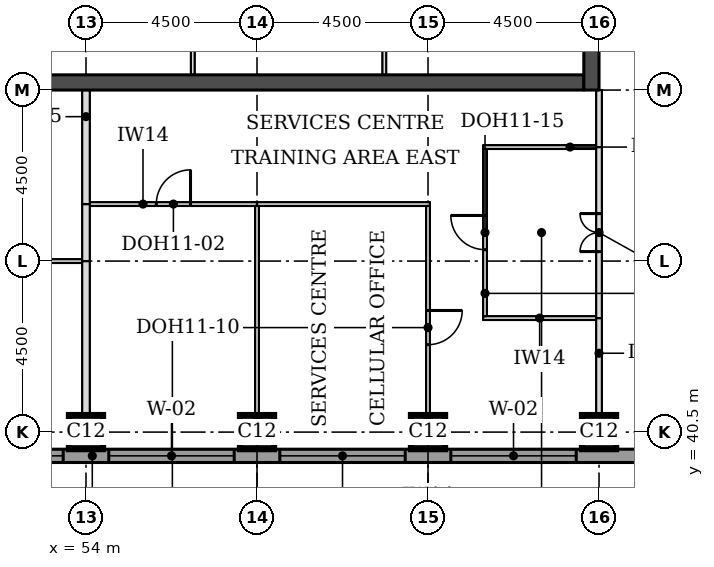
"""IFC4 building model, lengths in metres.
Left out: names, types, materials, properties, quantities, classifications, styles, units other than length and angle.
Written with IfcOpenShell. Run it as: python <this file> out.ifc"""

import sys

from ifc_helpers import new_model, si_unit, direction, frame, frame_2d, origin, origin_2d, place, context, subcontext, project, spatial, rectangle, extrude, element, fill, save


model = new_model("IFC4")
c1 = context("Model", 3, precision=1e-05, world=origin(), true_north=direction((0.0, 1.0)))
c2 = subcontext(c1, "Body", "Model", "MODEL_VIEW")
j1 = project(units=[si_unit("LENGTHUNIT", "METRE"), si_unit("PLANEANGLEUNIT", "RADIAN")], contexts=[c1])
p1 = place(None, origin())
s1 = spatial("IfcSite", under=j1, at=p1, CompositionType="ELEMENT")
p2 = place(p1, origin())
s2 = spatial("IfcBuilding", under=s1, at=p2, CompositionType="ELEMENT")
p3 = place(p2, frame((0.0, 0.0, 237.8)))
s3 = spatial("IfcBuildingStorey", under=s2, at=p3, CompositionType="ELEMENT", Elevation=237.8)
for number, where, z_axis, x_axis in (
    (1, (54.0, 40.5, 0.0), (0.0, 0.0, 1.0), (1.0, 0.0, 0.0)),
    (2, (58.5, 40.5, 0.0), (0.0, 0.0, 1.0), (1.0, 0.0, 0.0)),
    (3, (63.0, 40.5, 0.0), (0.0, 0.0, 1.0), (1.0, 0.0, 0.0)),
    (4, (67.5, 40.5, 0.0), (0.0, 0.0, 1.0), (1.0, 0.0, 0.0)),
):
    element("IfcColumn", number, at=place(p3, frame(where, z_axis=z_axis, x_axis=x_axis)), inside=s3, PredefinedType="COLUMN", context=c2, shape_type="SweptSolid", body=[
        extrude(rectangle(XDim=0.9, YDim=0.9, at=origin_2d()), origin(), (0.0, 0.0, 1.0), 3.7),
    ])
p4 = place(p3, frame((45.4, 49.7, 0.0), z_axis=(0.0, 0.0, 1.0), x_axis=(1.0, 0.0, 0.0)))
e5 = element("IfcWall", 5, at=p4, inside=s3, PredefinedType="SHEAR", context=c2, shape_type="SweptSolid", body=[
    extrude(rectangle(XDim=21.7, YDim=0.4, at=frame_2d((10.85, 0.0))), origin(), (0.0, 0.0, 1.0), 3.7),
])
p5 = place(p3, frame((67.3, 49.5, 0.0), z_axis=(0.0, 0.0, 1.0), x_axis=(0.0, 1.0, 0.0)))
e6 = element("IfcWall", 6, at=p5, inside=s3, PredefinedType="SHEAR", context=c2, shape_type="SweptSolid", body=[
    extrude(rectangle(XDim=22.5, YDim=0.4, at=frame_2d((11.25, 0.0))), origin(), (0.0, 0.0, 1.0), 3.7),
])
p6 = place(p5, frame((4.2, 0.0, 0.0)))
e7 = element("IfcOpeningElement", 7, at=p6, cuts=e6, PredefinedType="OPENING", context=c2, shape_type="SweptSolid", body=[
    extrude(rectangle(XDim=1.8, YDim=2.1, at=frame_2d((0.9, 1.05))), frame((0.0, 0.21, 0.0), z_axis=(0.0, -1.0, 0.0), x_axis=(1.0, 0.0, 0.0)), (0.0, 0.0, 1.0), 0.42),
])
p7 = place(p5, frame((6.9, 0.0, 0.0)))
e8 = element("IfcOpeningElement", 8, at=p7, cuts=e6, PredefinedType="OPENING", context=c2, shape_type="SweptSolid", body=[
    extrude(rectangle(XDim=1.1, YDim=2.1, at=frame_2d((0.55, 1.05))), frame((0.0, 0.21, 0.0), z_axis=(0.0, -1.0, 0.0), x_axis=(1.0, 0.0, 0.0)), (0.0, 0.0, 1.0), 0.42),
])
p8 = place(p5, frame((13.6, 0.0, 0.0)))
e9 = element("IfcOpeningElement", 9, at=p8, cuts=e6, PredefinedType="OPENING", context=c2, shape_type="SweptSolid", body=[
    extrude(rectangle(XDim=1.1, YDim=2.1, at=frame_2d((0.55, 1.05))), frame((0.0, 0.21, 0.0), z_axis=(0.0, -1.0, 0.0), x_axis=(1.0, 0.0, 0.0)), (0.0, 0.0, 1.0), 0.42),
])
p9 = place(p5, frame((16.5, 0.0, 0.0)))
e10 = element("IfcOpeningElement", 10, at=p9, cuts=e6, PredefinedType="OPENING", context=c2, shape_type="SweptSolid", body=[
    extrude(rectangle(XDim=1.8, YDim=2.1, at=frame_2d((0.9, 1.05))), frame((0.0, 0.21, 0.0), z_axis=(0.0, -1.0, 0.0), x_axis=(1.0, 0.0, 0.0)), (0.0, 0.0, 1.0), 0.42),
])
p10 = place(p3, frame((36.0, 39.875, 0.0), z_axis=(0.0, 0.0, 1.0), x_axis=(1.0, 0.0, 0.0)))
e11 = element("IfcWall", 11, at=p10, inside=s3, PredefinedType="STANDARD", context=c2, shape_type="SweptSolid", body=[
    extrude(rectangle(XDim=36.331, YDim=0.35, at=frame_2d((18.166, 0.0))), origin(), (0.0, 0.0, 1.0), 3.525),
])
p11 = place(p10, frame((5.1, 0.0, 0.9)))
e12 = element("IfcOpeningElement", 12, at=p11, cuts=e11, PredefinedType="OPENING", context=c2, shape_type="SweptSolid", body=[
    extrude(rectangle(XDim=3.3, YDim=1.9, at=frame_2d((1.65, 0.95))), frame((0.0, 0.185, 0.0), z_axis=(0.0, -1.0, 0.0), x_axis=(1.0, 0.0, 0.0)), (0.0, 0.0, 1.0), 0.37),
])
p12 = place(p10, frame((9.6, 0.0, 0.9)))
e13 = element("IfcOpeningElement", 13, at=p12, cuts=e11, PredefinedType="OPENING", context=c2, shape_type="SweptSolid", body=[
    extrude(rectangle(XDim=3.3, YDim=1.9, at=frame_2d((1.65, 0.95))), frame((0.0, 0.185, 0.0), z_axis=(0.0, -1.0, 0.0), x_axis=(1.0, 0.0, 0.0)), (0.0, 0.0, 1.0), 0.37),
])
p13 = place(p10, frame((14.1, 0.0, 0.9)))
e14 = element("IfcOpeningElement", 14, at=p13, cuts=e11, PredefinedType="OPENING", context=c2, shape_type="SweptSolid", body=[
    extrude(rectangle(XDim=3.3, YDim=1.9, at=frame_2d((1.65, 0.95))), frame((0.0, 0.185, 0.0), z_axis=(0.0, -1.0, 0.0), x_axis=(1.0, 0.0, 0.0)), (0.0, 0.0, 1.0), 0.37),
])
p14 = place(p10, frame((18.6, 0.0, 0.9)))
e15 = element("IfcOpeningElement", 15, at=p14, cuts=e11, PredefinedType="OPENING", context=c2, shape_type="SweptSolid", body=[
    extrude(rectangle(XDim=3.3, YDim=1.9, at=frame_2d((1.65, 0.95))), frame((0.0, 0.185, 0.0), z_axis=(0.0, -1.0, 0.0), x_axis=(1.0, 0.0, 0.0)), (0.0, 0.0, 1.0), 0.37),
])
p15 = place(p10, frame((23.1, 0.0, 0.9)))
e16 = element("IfcOpeningElement", 16, at=p15, cuts=e11, PredefinedType="OPENING", context=c2, shape_type="SweptSolid", body=[
    extrude(rectangle(XDim=3.3, YDim=1.9, at=frame_2d((1.65, 0.95))), frame((0.0, 0.185, 0.0), z_axis=(0.0, -1.0, 0.0), x_axis=(1.0, 0.0, 0.0)), (0.0, 0.0, 1.0), 0.37),
])
p16 = place(p10, frame((27.6, 0.0, 0.9)))
e17 = element("IfcOpeningElement", 17, at=p16, cuts=e11, PredefinedType="OPENING", context=c2, shape_type="SweptSolid", body=[
    extrude(rectangle(XDim=3.3, YDim=1.9, at=frame_2d((1.65, 0.95))), frame((0.0, 0.185, 0.0), z_axis=(0.0, -1.0, 0.0), x_axis=(1.0, 0.0, 0.0)), (0.0, 0.0, 1.0), 0.37),
])
p17 = place(p3, frame((64.45, 43.5, 0.0), z_axis=(0.0, 0.0, 1.0), x_axis=(1.0, 0.0, 0.0)))
e18 = element("IfcWall", 18, at=p17, inside=s3, PredefinedType="PARTITIONING", context=c2, shape_type="SweptSolid", body=[
    extrude(rectangle(XDim=2.975, YDim=0.1, at=frame_2d((1.488, 0.0))), origin(), (0.0, 0.0, 1.0), 3.55),
])
p18 = place(p3, frame((49.45, 45.0, 0.0), z_axis=(0.0, 0.0, 1.0), x_axis=(1.0, 0.0, 0.0)))
e19 = element("IfcWall", 19, at=p18, inside=s3, PredefinedType="PARTITIONING", context=c2, shape_type="SweptSolid", body=[
    extrude(rectangle(XDim=4.45, YDim=0.1, at=frame_2d((2.225, 0.0))), origin(), (0.0, 0.0, 1.0), 3.55),
])
p19 = place(p3, frame((54.1, 46.5, 0.0), z_axis=(0.0, 0.0, 1.0), x_axis=(1.0, 0.0, 0.0)))
e20 = element("IfcWall", 20, at=p19, inside=s3, PredefinedType="PARTITIONING", context=c2, shape_type="SweptSolid", body=[
    extrude(rectangle(XDim=4.4, YDim=0.1, at=frame_2d((2.2, 0.0))), origin(), (0.0, 0.0, 1.0), 3.55),
])
p20 = place(p19, frame((1.75, 0.0, 0.0)))
e21 = element("IfcOpeningElement", 21, at=p20, cuts=e20, PredefinedType="OPENING", context=c2, shape_type="SweptSolid", body=[
    extrude(rectangle(XDim=0.9, YDim=2.1, at=frame_2d((0.45, 1.05))), frame((0.0, 0.06, 0.0), z_axis=(0.0, -1.0, 0.0), x_axis=(1.0, 0.0, 0.0)), (0.0, 0.0, 1.0), 0.12),
])
p21 = place(p3, frame((58.5, 46.5, 0.0), z_axis=(0.0, 0.0, 1.0), x_axis=(1.0, 0.0, 0.0)))
e22 = element("IfcWall", 22, at=p21, inside=s3, PredefinedType="PARTITIONING", context=c2, shape_type="SweptSolid", body=[
    extrude(rectangle(XDim=4.55, YDim=0.1, at=frame_2d((2.275, 0.0))), origin(), (0.0, 0.0, 1.0), 3.55),
])
p22 = place(p3, frame((64.45, 48.0, 0.0), z_axis=(0.0, 0.0, 1.0), x_axis=(1.0, 0.0, 0.0)))
e23 = element("IfcWall", 23, at=p22, inside=s3, PredefinedType="PARTITIONING", context=c2, shape_type="SweptSolid", body=[
    extrude(rectangle(XDim=2.975, YDim=0.1, at=frame_2d((1.488, 0.0))), origin(), (0.0, 0.0, 1.0), 3.55),
])
p23 = place(p3, frame((54.0, 40.05, 0.0), z_axis=(0.0, 0.0, 1.0), x_axis=(0.0, 1.0, 0.0)))
e24 = element("IfcWall", 24, at=p23, inside=s3, PredefinedType="PARTITIONING", context=c2, shape_type="SweptSolid", body=[
    extrude(rectangle(XDim=4.95, YDim=0.2, at=frame_2d((2.475, 0.0))), origin(), (0.0, 0.0, 1.0), 3.55),
])
p24 = place(p3, frame((58.5, 40.05, 0.0), z_axis=(0.0, 0.0, 1.0), x_axis=(0.0, 1.0, 0.0)))
e25 = element("IfcWall", 25, at=p24, inside=s3, PredefinedType="PARTITIONING", context=c2, shape_type="SweptSolid", body=[
    extrude(rectangle(XDim=6.4, YDim=0.1, at=frame_2d((3.2, 0.0))), origin(), (0.0, 0.0, 1.0), 3.55),
])
p25 = place(p3, frame((63.0, 40.05, 0.0), z_axis=(0.0, 0.0, 1.0), x_axis=(0.0, 1.0, 0.0)))
e26 = element("IfcWall", 26, at=p25, inside=s3, PredefinedType="PARTITIONING", context=c2, shape_type="SweptSolid", body=[
    extrude(rectangle(XDim=6.4, YDim=0.1, at=frame_2d((3.2, 0.0))), origin(), (0.0, 0.0, 1.0), 3.55),
])
p26 = place(p25, frame((2.75, 0.0, 0.0)))
e27 = element("IfcOpeningElement", 27, at=p26, cuts=e26, PredefinedType="OPENING", context=c2, shape_type="SweptSolid", body=[
    extrude(rectangle(XDim=0.9, YDim=2.1, at=frame_2d((0.45, 1.05))), frame((0.0, 0.06, 0.0), z_axis=(0.0, -1.0, 0.0), x_axis=(1.0, 0.0, 0.0)), (0.0, 0.0, 1.0), 0.12),
])
p27 = place(p3, frame((67.5, 40.05, 0.0), z_axis=(0.0, 0.0, 1.0), x_axis=(0.0, 1.0, 0.0)))
e28 = element("IfcWall", 28, at=p27, inside=s3, PredefinedType="PARTITIONING", context=c2, shape_type="SweptSolid", body=[
    extrude(rectangle(XDim=3.45, YDim=0.15, at=frame_2d((1.725, 0.0))), origin(), (0.0, 0.0, 1.0), 3.022),
])
p28 = place(p3, frame((67.5, 43.5, 0.0), z_axis=(0.0, 0.0, 1.0), x_axis=(0.0, 1.0, 0.0)))
e29 = element("IfcWall", 29, at=p28, inside=s3, PredefinedType="PARTITIONING", context=c2, shape_type="SweptSolid", body=[
    extrude(rectangle(XDim=4.5, YDim=0.15, at=frame_2d((2.25, 0.0))), origin(), (0.0, 0.0, 1.0), 3.022),
])
p29 = place(p28, frame((1.75, 0.0, 0.0)))
e30 = element("IfcOpeningElement", 30, at=p29, cuts=e29, PredefinedType="OPENING", context=c2, shape_type="SweptSolid", body=[
    extrude(rectangle(XDim=1.0, YDim=2.1, at=frame_2d((0.5, 1.05))), frame((0.0, 0.085, 0.0), z_axis=(0.0, -1.0, 0.0), x_axis=(1.0, 0.0, 0.0)), (0.0, 0.0, 1.0), 0.17),
])
p30 = place(p3, frame((64.5, 43.55, 0.0), z_axis=(0.0, 0.0, 1.0), x_axis=(0.0, 1.0, 0.0)))
e31 = element("IfcWall", 31, at=p30, inside=s3, PredefinedType="PARTITIONING", context=c2, shape_type="SweptSolid", body=[
    extrude(rectangle(XDim=4.4, YDim=0.1, at=frame_2d((2.2, 0.0))), origin(), (0.0, 0.0, 1.0), 3.55),
])
p31 = place(p30, frame((1.75, 0.0, 0.0)))
e32 = element("IfcOpeningElement", 32, at=p31, cuts=e31, PredefinedType="OPENING", context=c2, shape_type="SweptSolid", body=[
    extrude(rectangle(XDim=0.9, YDim=2.1, at=frame_2d((0.45, 1.05))), frame((0.0, 0.06, 0.0), z_axis=(0.0, -1.0, 0.0), x_axis=(1.0, 0.0, 0.0)), (0.0, 0.0, 1.0), 0.12),
])
p32 = place(p3, frame((54.0, 45.0, 0.0), z_axis=(0.0, 0.0, 1.0), x_axis=(0.0, 1.0, 0.0)))
e33 = element("IfcWall", 33, at=p32, inside=s3, PredefinedType="PARTITIONING", context=c2, shape_type="SweptSolid", body=[
    extrude(rectangle(XDim=1.5, YDim=0.2, at=frame_2d((0.75, 0.0))), origin(), (0.0, 0.0, 1.0), 3.55),
])
p33 = place(p3, frame((54.0, 46.5, 0.0), z_axis=(0.0, 0.0, 1.0), x_axis=(0.0, 1.0, 0.0)))
e34 = element("IfcWall", 34, at=p33, inside=s3, PredefinedType="PARTITIONING", context=c2, shape_type="SweptSolid", body=[
    extrude(rectangle(XDim=3.0, YDim=0.2, at=frame_2d((1.5, 0.0))), origin(), (0.0, 0.0, 1.0), 3.55),
])
p34 = place(p3, frame((67.5, 48.0, 0.0), z_axis=(0.0, 0.0, 1.0), x_axis=(0.0, 1.0, 0.0)))
e35 = element("IfcWall", 35, at=p34, inside=s3, PredefinedType="PARTITIONING", context=c2, shape_type="SweptSolid", body=[
    extrude(rectangle(XDim=1.5, YDim=0.15, at=frame_2d((0.75, 0.0))), origin(), (0.0, 0.0, 1.0), 3.022),
])
for number, where, z_axis, x_axis in (
    (36, (56.81, 49.9, 0.0), (0.0, 0.0, 1.0), (0.0, 1.0, 0.0)),
    (37, (61.85, 49.9, 0.0), (0.0, 0.0, 1.0), (0.0, 1.0, 0.0)),
):
    element("IfcWall", number, at=place(p3, frame(where, z_axis=z_axis, x_axis=x_axis)), inside=s3, PredefinedType="PARTITIONING", context=c2, shape_type="SweptSolid", body=[
        extrude(rectangle(XDim=3.1, YDim=0.1, at=frame_2d((1.55, 0.0))), origin(), (0.0, 0.0, 1.0), 3.55),
    ])
p35 = place(p13, origin())
e38 = element("IfcWindow", 38, at=p35, inside=s3, PartitioningType="SINGLE_PANEL", PredefinedType="WINDOW", context=c2, shape_type="SweptSolid", body=[
    extrude(rectangle(XDim=3.3, YDim=1.9, at=frame_2d((1.65, 0.95))), frame((0.0, 0.085, 0.0), z_axis=(0.0, -1.0, 0.0), x_axis=(1.0, 0.0, 0.0)), (0.0, 0.0, 1.0), 0.06),
])
fill(e14, e38)
p36 = place(p14, origin())
e39 = element("IfcWindow", 39, at=p36, inside=s3, PartitioningType="SINGLE_PANEL", PredefinedType="WINDOW", context=c2, shape_type="SweptSolid", body=[
    extrude(rectangle(XDim=3.3, YDim=1.9, at=frame_2d((1.65, 0.95))), frame((0.0, 0.085, 0.0), z_axis=(0.0, -1.0, 0.0), x_axis=(1.0, 0.0, 0.0)), (0.0, 0.0, 1.0), 0.06),
])
fill(e15, e39)
p37 = place(p15, origin())
e40 = element("IfcWindow", 40, at=p37, inside=s3, PartitioningType="SINGLE_PANEL", PredefinedType="WINDOW", context=c2, shape_type="SweptSolid", body=[
    extrude(rectangle(XDim=3.3, YDim=1.9, at=frame_2d((1.65, 0.95))), frame((0.0, 0.085, 0.0), z_axis=(0.0, -1.0, 0.0), x_axis=(1.0, 0.0, 0.0)), (0.0, 0.0, 1.0), 0.06),
])
fill(e16, e40)
p38 = place(p16, origin())
e41 = element("IfcWindow", 41, at=p38, inside=s3, PartitioningType="SINGLE_PANEL", PredefinedType="WINDOW", context=c2, shape_type="SweptSolid", body=[
    extrude(rectangle(XDim=3.3, YDim=1.9, at=frame_2d((1.65, 0.95))), frame((0.0, 0.085, 0.0), z_axis=(0.0, -1.0, 0.0), x_axis=(1.0, 0.0, 0.0)), (0.0, 0.0, 1.0), 0.06),
])
fill(e17, e41)
p39 = place(p29, origin())
e42 = element("IfcDoor", 42, at=p39, inside=s3, OperationType="DOUBLE_DOOR_SINGLE_SWING", PredefinedType="DOOR", context=c2, shape_type="SweptSolid", body=[
    extrude(rectangle(XDim=1.0, YDim=2.1, at=frame_2d((0.5, 1.05))), frame((0.0, 0.025, 0.0), z_axis=(0.0, -1.0, 0.0), x_axis=(1.0, 0.0, 0.0)), (0.0, 0.0, 1.0), 0.05),
])
fill(e30, e42)
p40 = place(p31, origin())
e43 = element("IfcDoor", 43, at=p40, inside=s3, OperationType="SINGLE_SWING_RIGHT", PredefinedType="DOOR", context=c2, shape_type="SweptSolid", body=[
    extrude(rectangle(XDim=0.9, YDim=2.1, at=frame_2d((0.45, 1.05))), frame((0.0, 0.025, 0.0), z_axis=(0.0, -1.0, 0.0), x_axis=(1.0, 0.0, 0.0)), (0.0, 0.0, 1.0), 0.05),
])
fill(e32, e43)
p41 = place(p20, origin())
e44 = element("IfcDoor", 44, at=p41, inside=s3, OperationType="SINGLE_SWING_RIGHT", PredefinedType="DOOR", context=c2, shape_type="SweptSolid", body=[
    extrude(rectangle(XDim=0.9, YDim=2.1, at=frame_2d((0.45, 1.05))), frame((0.0, 0.025, 0.0), z_axis=(0.0, -1.0, 0.0), x_axis=(1.0, 0.0, 0.0)), (0.0, 0.0, 1.0), 0.05),
])
fill(e21, e44)
p42 = place(p26, frame((0.9, 0.0, 0.0), z_axis=(0.0, 0.0, 1.0), x_axis=(-1.0, 0.0, 0.0)))
e45 = element("IfcDoor", 45, at=p42, inside=s3, OperationType="SINGLE_SWING_LEFT", PredefinedType="DOOR", context=c2, shape_type="SweptSolid", body=[
    extrude(rectangle(XDim=0.9, YDim=2.1, at=frame_2d((0.45, 1.05))), frame((0.0, 0.025, 0.0), z_axis=(0.0, -1.0, 0.0), x_axis=(1.0, 0.0, 0.0)), (0.0, 0.0, 1.0), 0.05),
])
fill(e27, e45)
save(model, sys.argv[1])
